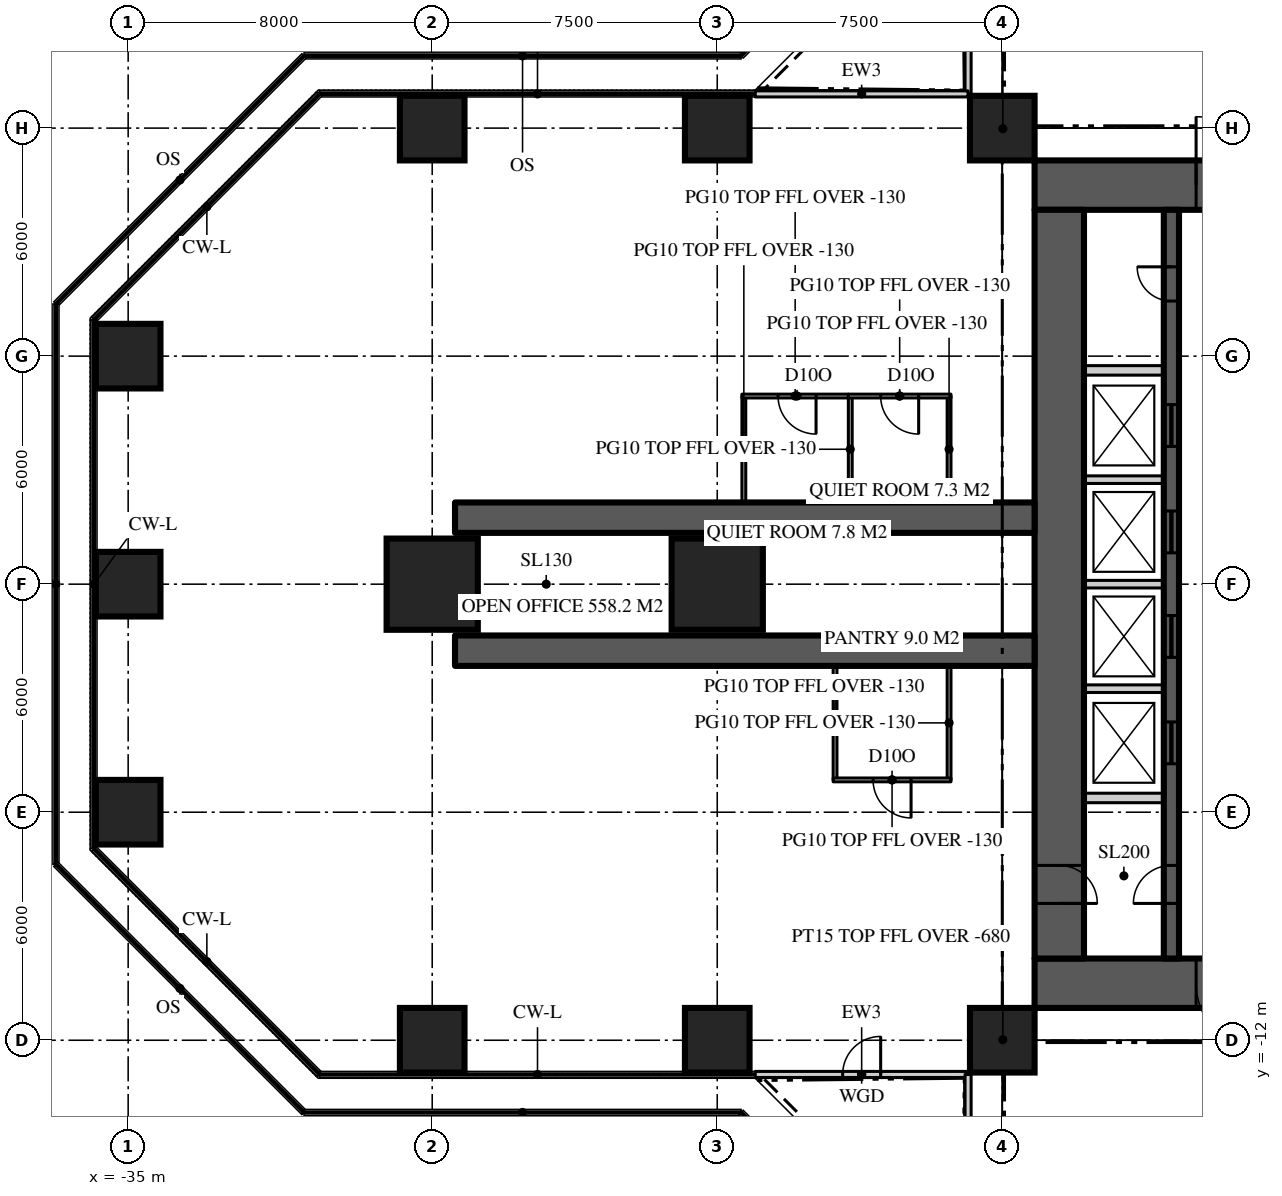
"""IFC4 building model, lengths in metres.
Left out: names, types, materials, properties, quantities, classifications, styles, units other than length and angle.
Written with IfcOpenShell. Run it as: python <this file> out.ifc"""

import sys

from ifc_helpers import new_model, si_unit, direction, frame, frame_2d, origin, origin_2d, place, context, subcontext, project, spatial, rectangle, extrude, element, fill, save


model = new_model("IFC4")
c1 = context("Model", 3, precision=1e-05, world=origin(), true_north=direction((0.0, 1.0)))
c2 = subcontext(c1, "Body", "Model", "MODEL_VIEW")
j1 = project(units=[si_unit("LENGTHUNIT", "METRE"), si_unit("PLANEANGLEUNIT", "RADIAN")], contexts=[c1])
p1 = place(None, origin())
s1 = spatial("IfcSite", under=j1, at=p1, CompositionType="ELEMENT")
p2 = place(p1, origin())
s2 = spatial("IfcBuilding", under=s1, at=p2, CompositionType="ELEMENT")
p3 = place(p2, frame((0.0, 0.0, 90.3)))
s3 = spatial("IfcBuildingStorey", under=s2, at=p3, CompositionType="ELEMENT", Elevation=90.3)
p4 = place(p3, frame((-11.15, 10.5, 0.0), z_axis=(0.0, 0.0, 1.0), x_axis=(1.0, 0.0, 0.0)))
e1 = element("IfcWall", 1, at=p4, inside=s3, PredefinedType="SHEAR", context=c2, shape_type="SweptSolid", body=[
    extrude(rectangle(XDim=22.3, YDim=1.3, at=frame_2d((11.15, 0.0))), origin(), (0.0, 0.0, 1.0), 3.9),
])
p5 = place(p4, frame((4.25, 0.0, 0.0)))
e2 = element("IfcOpeningElement", 2, at=p5, cuts=e1, PredefinedType="OPENING", context=c2, shape_type="SweptSolid", body=[
    extrude(rectangle(XDim=1.8, YDim=2.2, at=frame_2d((0.9, 1.1))), frame((0.0, 0.66, 0.0), z_axis=(0.0, -1.0, 0.0), x_axis=(1.0, 0.0, 0.0)), (0.0, 0.0, 1.0), 1.32),
])
p6 = place(p4, frame((16.25, 0.0, 0.0)))
e3 = element("IfcOpeningElement", 3, at=p6, cuts=e1, PredefinedType="OPENING", context=c2, shape_type="SweptSolid", body=[
    extrude(rectangle(XDim=1.8, YDim=2.2, at=frame_2d((0.9, 1.1))), frame((0.0, 0.66, 0.0), z_axis=(0.0, -1.0, 0.0), x_axis=(1.0, 0.0, 0.0)), (0.0, 0.0, 1.0), 1.32),
])
p7 = place(p3, frame((11.15, -10.5, 0.0), z_axis=(0.0, 0.0, 1.0), x_axis=(-1.0, 0.0, 0.0)))
e4 = element("IfcWall", 4, at=p7, inside=s3, PredefinedType="SHEAR", context=c2, shape_type="SweptSolid", body=[
    extrude(rectangle(XDim=22.3, YDim=1.3, at=frame_2d((11.15, 0.0))), origin(), (0.0, 0.0, 1.0), 3.9),
])
p8 = place(p7, frame((16.25, 0.0, 0.0)))
e5 = element("IfcOpeningElement", 5, at=p8, cuts=e4, PredefinedType="OPENING", context=c2, shape_type="SweptSolid", body=[
    extrude(rectangle(XDim=1.8, YDim=2.2, at=frame_2d((0.9, 1.1))), frame((0.0, 0.66, 0.0), z_axis=(0.0, -1.0, 0.0), x_axis=(1.0, 0.0, 0.0)), (0.0, 0.0, 1.0), 1.32),
])
p9 = place(p7, frame((4.25, 0.0, 0.0)))
e6 = element("IfcOpeningElement", 6, at=p9, cuts=e4, PredefinedType="OPENING", context=c2, shape_type="SweptSolid", body=[
    extrude(rectangle(XDim=1.8, YDim=2.2, at=frame_2d((0.9, 1.1))), frame((0.0, 0.66, 0.0), z_axis=(0.0, -1.0, 0.0), x_axis=(1.0, 0.0, 0.0)), (0.0, 0.0, 1.0), 1.32),
])
p10 = place(p3, frame((-10.5, 9.85, 0.0), z_axis=(0.0, 0.0, 1.0), x_axis=(0.0, -1.0, 0.0)))
e7 = element("IfcWall", 7, at=p10, inside=s3, PredefinedType="SHEAR", context=c2, shape_type="SweptSolid", body=[
    extrude(rectangle(XDim=19.7, YDim=1.3, at=frame_2d((9.85, 0.0))), origin(), (0.0, 0.0, 1.0), 3.9),
])
p11 = place(p10, frame((17.25, 0.0, 0.0)))
e8 = element("IfcOpeningElement", 8, at=p11, cuts=e7, PredefinedType="OPENING", context=c2, shape_type="SweptSolid", body=[
    extrude(rectangle(XDim=1.0, YDim=2.2, at=frame_2d((0.5, 1.1))), frame((0.0, 0.66, 0.0), z_axis=(0.0, -1.0, 0.0), x_axis=(1.0, 0.0, 0.0)), (0.0, 0.0, 1.0), 1.32),
])
for number, where, z_axis, x_axis in (
    (9, (-11.15, 1.75, 0.0), (0.0, 0.0, 1.0), (-1.0, 0.0, 0.0)),
    (10, (-11.15, -1.75, 0.0), (0.0, 0.0, 1.0), (-1.0, 0.0, 0.0)),
):
    element("IfcWall", number, at=place(p3, frame(where, z_axis=z_axis, x_axis=x_axis)), inside=s3, PredefinedType="SHEAR", context=c2, shape_type="SweptSolid", body=[
        extrude(rectangle(XDim=15.25, YDim=0.8, at=frame_2d((7.625, 0.0))), origin(), (0.0, 0.0, 1.0), 3.9),
    ])
for number, where, z_axis, x_axis in (
    (11, (-27.0, -12.0, 0.0), (0.0, 0.0, 1.0), (1.0, 0.0, 0.0)),
    (12, (-19.5, -12.0, 0.0), (0.0, 0.0, 1.0), (1.0, 0.0, 0.0)),
    (13, (-12.0, -12.0, 0.0), (0.0, 0.0, 1.0), (1.0, 0.0, 0.0)),
    (14, (-35.0, -6.0, 0.0), (0.0, 0.0, 1.0), (1.0, 0.0, 0.0)),
    (15, (-35.0, 0.0, 0.0), (0.0, 0.0, 1.0), (1.0, 0.0, 0.0)),
):
    element("IfcColumn", number, at=place(p3, frame(where, z_axis=z_axis, x_axis=x_axis)), inside=s3, PredefinedType="COLUMN", context=c2, shape_type="SweptSolid", body=[
        extrude(rectangle(XDim=1.7, YDim=1.7, at=origin_2d()), origin(), (0.0, 0.0, 1.0), 3.9),
    ])
for number, where, z_axis, x_axis in (
    (16, (-27.0, 0.0, 0.0), (0.0, 0.0, 1.0), (1.0, 0.0, 0.0)),
    (17, (-19.5, 0.0, 0.0), (0.0, 0.0, 1.0), (1.0, 0.0, 0.0)),
):
    element("IfcColumn", number, at=place(p3, frame(where, z_axis=z_axis, x_axis=x_axis)), inside=s3, PredefinedType="COLUMN", context=c2, shape_type="SweptSolid", body=[
        extrude(rectangle(XDim=2.4, YDim=2.4, at=origin_2d()), origin(), (0.0, 0.0, 1.0), 3.9),
    ])
for number, where, z_axis, x_axis in (
    (18, (-35.0, 6.0, 0.0), (0.0, 0.0, 1.0), (1.0, 0.0, 0.0)),
    (19, (-27.0, 12.0, 0.0), (0.0, 0.0, 1.0), (1.0, 0.0, 0.0)),
    (20, (-19.5, 12.0, 0.0), (0.0, 0.0, 1.0), (1.0, 0.0, 0.0)),
    (21, (-12.0, 12.0, 0.0), (0.0, 0.0, 1.0), (1.0, 0.0, 0.0)),
):
    element("IfcColumn", number, at=place(p3, frame(where, z_axis=z_axis, x_axis=x_axis)), inside=s3, PredefinedType="COLUMN", context=c2, shape_type="SweptSolid", body=[
        extrude(rectangle(XDim=1.7, YDim=1.7, at=origin_2d()), origin(), (0.0, 0.0, 1.0), 3.9),
    ])
p12 = place(p3, frame((-12.9, 18.5, 0.0), z_axis=(0.0, 0.0, 1.0), x_axis=(0.0, -1.0, 0.0)))
e22 = element("IfcWall", 22, at=p12, inside=s3, PredefinedType="SOLIDWALL", context=c2, shape_type="SweptSolid", body=[
    extrude(rectangle(XDim=5.6, YDim=0.16, at=frame_2d((2.8, 0.0))), origin(), (0.0, 0.0, 1.0), 3.77),
])
p13 = place(p12, frame((2.3, 0.0, 0.0)))
e23 = element("IfcOpeningElement", 23, at=p13, cuts=e22, PredefinedType="OPENING", context=c2, shape_type="SweptSolid", body=[
    extrude(rectangle(XDim=1.0, YDim=2.2, at=frame_2d((0.5, 1.1))), frame((0.0, 0.09, 0.0), z_axis=(0.0, -1.0, 0.0), x_axis=(1.0, 0.0, 0.0)), (0.0, 0.0, 1.0), 0.18),
])
p14 = place(p3, frame((-12.9, 12.9, 0.0), z_axis=(0.0, 0.0, 1.0), x_axis=(-1.0, 0.0, 0.0)))
e24 = element("IfcWall", 24, at=p14, inside=s3, PredefinedType="SOLIDWALL", context=c2, shape_type="SweptSolid", body=[
    extrude(rectangle(XDim=5.6, YDim=0.16, at=frame_2d((2.8, 0.0))), origin(), (0.0, 0.0, 1.0), 3.77),
])
p15 = place(p3, frame((-18.5, -12.9, 0.0), z_axis=(0.0, 0.0, 1.0), x_axis=(1.0, 0.0, 0.0)))
e25 = element("IfcWall", 25, at=p15, inside=s3, PredefinedType="SOLIDWALL", context=c2, shape_type="SweptSolid", body=[
    extrude(rectangle(XDim=5.6, YDim=0.16, at=frame_2d((2.8, 0.0))), origin(), (0.0, 0.0, 1.0), 3.77),
])
p16 = place(p15, frame((2.3, 0.0, 0.0)))
e26 = element("IfcOpeningElement", 26, at=p16, cuts=e25, PredefinedType="OPENING", context=c2, shape_type="SweptSolid", body=[
    extrude(rectangle(XDim=1.0, YDim=2.2, at=frame_2d((0.5, 1.1))), frame((0.0, 0.09, 0.0), z_axis=(0.0, -1.0, 0.0), x_axis=(1.0, 0.0, 0.0)), (0.0, 0.0, 1.0), 0.18),
])
p17 = place(p3, frame((-12.9, -12.9, 0.0), z_axis=(0.0, 0.0, 1.0), x_axis=(0.0, -1.0, 0.0)))
e27 = element("IfcWall", 27, at=p17, inside=s3, PredefinedType="SOLIDWALL", context=c2, shape_type="SweptSolid", body=[
    extrude(rectangle(XDim=5.6, YDim=0.16, at=frame_2d((2.8, 0.0))), origin(), (0.0, 0.0, 1.0), 3.77),
])
p18 = place(p3, frame((-7.55, -9.85, 0.0), z_axis=(0.0, 0.0, 1.0), x_axis=(0.0, 1.0, 0.0)))
e28 = element("IfcWall", 28, at=p18, inside=s3, PredefinedType="SHEAR", context=c2, shape_type="SweptSolid", body=[
    extrude(rectangle(XDim=19.7, YDim=0.4, at=frame_2d((9.85, 0.0))), origin(), (0.0, 0.0, 1.0), 3.9),
])
p19 = place(p18, frame((1.45, 0.0, 0.0)))
e29 = element("IfcOpeningElement", 29, at=p19, cuts=e28, PredefinedType="OPENING", context=c2, shape_type="SweptSolid", body=[
    extrude(rectangle(XDim=1.0, YDim=2.2, at=frame_2d((0.5, 1.1))), frame((0.0, 0.21, 0.0), z_axis=(0.0, -1.0, 0.0), x_axis=(1.0, 0.0, 0.0)), (0.0, 0.0, 1.0), 0.42),
])
p20 = place(p18, frame((17.3, 0.0, 0.0)))
e30 = element("IfcOpeningElement", 30, at=p20, cuts=e28, PredefinedType="OPENING", context=c2, shape_type="SweptSolid", body=[
    extrude(rectangle(XDim=0.9, YDim=2.1, at=frame_2d((0.45, 1.05))), frame((0.0, 0.21, 0.0), z_axis=(0.0, -1.0, 0.0), x_axis=(1.0, 0.0, 0.0)), (0.0, 0.0, 1.0), 0.42),
])
p21 = place(p18, frame((5.125, 0.0, 0.0)))
e31 = element("IfcOpeningElement", 31, at=p21, cuts=e28, PredefinedType="OPENING", context=c2, shape_type="SweptSolid", body=[
    extrude(rectangle(XDim=1.1, YDim=2.2, at=frame_2d((0.55, 1.1))), frame((0.0, 0.21, 0.0), z_axis=(0.0, -1.0, 0.0), x_axis=(1.0, 0.0, 0.0)), (0.0, 0.0, 1.0), 0.42),
])
p22 = place(p18, frame((7.925, 0.0, 0.0)))
e32 = element("IfcOpeningElement", 32, at=p22, cuts=e28, PredefinedType="OPENING", context=c2, shape_type="SweptSolid", body=[
    extrude(rectangle(XDim=1.1, YDim=2.2, at=frame_2d((0.55, 1.1))), frame((0.0, 0.21, 0.0), z_axis=(0.0, -1.0, 0.0), x_axis=(1.0, 0.0, 0.0)), (0.0, 0.0, 1.0), 0.42),
])
p23 = place(p18, frame((10.675, 0.0, 0.0)))
e33 = element("IfcOpeningElement", 33, at=p23, cuts=e28, PredefinedType="OPENING", context=c2, shape_type="SweptSolid", body=[
    extrude(rectangle(XDim=1.1, YDim=2.2, at=frame_2d((0.55, 1.1))), frame((0.0, 0.21, 0.0), z_axis=(0.0, -1.0, 0.0), x_axis=(1.0, 0.0, 0.0)), (0.0, 0.0, 1.0), 0.42),
])
p24 = place(p18, frame((13.475, 0.0, 0.0)))
e34 = element("IfcOpeningElement", 34, at=p24, cuts=e28, PredefinedType="OPENING", context=c2, shape_type="SweptSolid", body=[
    extrude(rectangle(XDim=1.1, YDim=2.2, at=frame_2d((0.55, 1.1))), frame((0.0, 0.21, 0.0), z_axis=(0.0, -1.0, 0.0), x_axis=(1.0, 0.0, 0.0)), (0.0, 0.0, 1.0), 0.42),
])
for number, where, z_axis, x_axis in (
    (35, (-9.85, 5.625, 0.0), (0.0, 0.0, 1.0), (1.0, 0.0, 0.0)),
    (36, (-9.85, -5.625, 0.0), (0.0, 0.0, 1.0), (1.0, 0.0, 0.0)),
):
    element("IfcWall", number, at=place(p3, frame(where, z_axis=z_axis, x_axis=x_axis)), inside=s3, PredefinedType="SOLIDWALL", context=c2, shape_type="SweptSolid", body=[
        extrude(rectangle(XDim=2.1, YDim=0.25, at=frame_2d((1.05, 0.0))), origin(), (0.0, 0.0, 1.0), 3.7),
    ])
for number, where, z_axis, x_axis in (
    (37, (-9.85, -2.75, 0.0), (0.0, 0.0, 1.0), (1.0, 0.0, 0.0)),
    (38, (-9.85, 0.0, 0.0), (0.0, 0.0, 1.0), (1.0, 0.0, 0.0)),
    (39, (-9.85, 2.75, 0.0), (0.0, 0.0, 1.0), (1.0, 0.0, 0.0)),
):
    element("IfcWall", number, at=place(p3, frame(where, z_axis=z_axis, x_axis=x_axis)), inside=s3, PredefinedType="SOLIDWALL", context=c2, shape_type="SweptSolid", body=[
        extrude(rectangle(XDim=2.1, YDim=0.2, at=frame_2d((1.05, 0.0))), origin(), (0.0, 0.0, 1.0), 3.7),
    ])
for number, where, z_axis, x_axis in (
    (40, (-13.4, -2.15, 0.0), (0.0, 0.0, 1.0), (0.0, -1.0, 0.0)),
    (41, (-16.4, -2.15, 0.0), (0.0, 0.0, 1.0), (0.0, -1.0, 0.0)),
):
    element("IfcWall", number, at=place(p3, frame(where, z_axis=z_axis, x_axis=x_axis)), inside=s3, PredefinedType="PARTITIONING", context=c2, shape_type="SweptSolid", body=[
        extrude(rectangle(XDim=3.0, YDim=0.1, at=frame_2d((1.5, 0.0))), origin(), (0.0, 0.0, 1.0), 3.77),
    ])
p25 = place(p3, frame((-13.35, -5.15, 0.0), z_axis=(0.0, 0.0, 1.0), x_axis=(-1.0, 0.0, 0.0)))
e42 = element("IfcWall", 42, at=p25, inside=s3, PredefinedType="PARTITIONING", context=c2, shape_type="SweptSolid", body=[
    extrude(rectangle(XDim=3.1, YDim=0.1, at=frame_2d((1.55, 0.0))), origin(), (0.0, 0.0, 1.0), 3.77),
])
p26 = place(p25, frame((1.05, 0.0, 0.0)))
e43 = element("IfcOpeningElement", 43, at=p26, cuts=e42, PredefinedType="OPENING", context=c2, shape_type="SweptSolid", body=[
    extrude(rectangle(XDim=1.0, YDim=2.2, at=frame_2d((0.5, 1.1))), frame((0.0, 0.06, 0.0), z_axis=(0.0, -1.0, 0.0), x_axis=(1.0, 0.0, 0.0)), (0.0, 0.0, 1.0), 0.12),
])
for number, where, z_axis, x_axis in (
    (44, (-13.4, 2.15, 0.0), (0.0, 0.0, 1.0), (0.0, 1.0, 0.0)),
    (45, (-16.0, 2.15, 0.0), (0.0, 0.0, 1.0), (0.0, 1.0, 0.0)),
):
    element("IfcWall", number, at=place(p3, frame(where, z_axis=z_axis, x_axis=x_axis)), inside=s3, PredefinedType="PARTITIONING", context=c2, shape_type="SweptSolid", body=[
        extrude(rectangle(XDim=2.8, YDim=0.1, at=frame_2d((1.4, 0.0))), origin(), (0.0, 0.0, 1.0), 3.77),
    ])
p27 = place(p3, frame((-13.35, 4.95, 0.0), z_axis=(0.0, 0.0, 1.0), x_axis=(-1.0, 0.0, 0.0)))
e46 = element("IfcWall", 46, at=p27, inside=s3, PredefinedType="PARTITIONING", context=c2, shape_type="SweptSolid", body=[
    extrude(rectangle(XDim=2.7, YDim=0.1, at=frame_2d((1.35, 0.0))), origin(), (0.0, 0.0, 1.0), 3.77),
])
p28 = place(p27, frame((0.85, 0.0, 0.0)))
e47 = element("IfcOpeningElement", 47, at=p28, cuts=e46, PredefinedType="OPENING", context=c2, shape_type="SweptSolid", body=[
    extrude(rectangle(XDim=1.0, YDim=2.2, at=frame_2d((0.5, 1.1))), frame((0.0, 0.06, 0.0), z_axis=(0.0, -1.0, 0.0), x_axis=(1.0, 0.0, 0.0)), (0.0, 0.0, 1.0), 0.12),
])
p29 = place(p3, frame((-18.8, 2.15, 0.0), z_axis=(0.0, 0.0, 1.0), x_axis=(0.0, 1.0, 0.0)))
e48 = element("IfcWall", 48, at=p29, inside=s3, PredefinedType="PARTITIONING", context=c2, shape_type="SweptSolid", body=[
    extrude(rectangle(XDim=2.8, YDim=0.1, at=frame_2d((1.4, 0.0))), origin(), (0.0, 0.0, 1.0), 3.77),
])
p30 = place(p3, frame((-16.05, 4.95, 0.0), z_axis=(0.0, 0.0, 1.0), x_axis=(-1.0, 0.0, 0.0)))
e49 = element("IfcWall", 49, at=p30, inside=s3, PredefinedType="PARTITIONING", context=c2, shape_type="SweptSolid", body=[
    extrude(rectangle(XDim=2.8, YDim=0.1, at=frame_2d((1.4, 0.0))), origin(), (0.0, 0.0, 1.0), 3.77),
])
p31 = place(p30, frame((0.85, 0.0, 0.0)))
e50 = element("IfcOpeningElement", 50, at=p31, cuts=e49, PredefinedType="OPENING", context=c2, shape_type="SweptSolid", body=[
    extrude(rectangle(XDim=1.0, YDim=2.2, at=frame_2d((0.5, 1.1))), frame((0.0, 0.06, 0.0), z_axis=(0.0, -1.0, 0.0), x_axis=(1.0, 0.0, 0.0)), (0.0, 0.0, 1.0), 0.12),
])
for number, where, z_axis, x_axis in (
    (51, (-11.15, 11.15, 0.0), (0.0, 0.0, 1.0), (-0.707, 0.707, 0.0)),
    (52, (-11.15, -11.15, 0.0), (0.0, 0.0, 1.0), (-0.707, -0.707, 0.0)),
):
    element("IfcWall", number, at=place(p3, frame(where, z_axis=z_axis, x_axis=x_axis)), inside=s3, PredefinedType="PARTITIONING", context=c2, shape_type="SweptSolid", body=[
        extrude(rectangle(XDim=2.362, YDim=0.15, at=frame_2d((1.181, 0.0))), origin(), (0.0, 0.0, 1.0), 3.22),
    ])
p32 = place(p16, origin())
e53 = element("IfcDoor", 53, at=p32, inside=s3, OperationType="SINGLE_SWING_RIGHT", PredefinedType="DOOR", context=c2, shape_type="SweptSolid", body=[
    extrude(rectangle(XDim=1.0, YDim=2.2, at=frame_2d((0.5, 1.1))), frame((0.0, 0.025, 0.0), z_axis=(0.0, -1.0, 0.0), x_axis=(1.0, 0.0, 0.0)), (0.0, 0.0, 1.0), 0.05),
])
fill(e26, e53)
p33 = place(p5, origin())
e54 = element("IfcDoor", 54, at=p33, inside=s3, OperationType="DOUBLE_DOOR_DOUBLE_SWING", PredefinedType="DOOR", context=c2, shape_type="SweptSolid", body=[
    extrude(rectangle(XDim=1.8, YDim=2.2, at=frame_2d((0.9, 1.1))), frame((0.0, 0.025, 0.0), z_axis=(0.0, -1.0, 0.0), x_axis=(1.0, 0.0, 0.0)), (0.0, 0.0, 1.0), 0.05),
])
fill(e2, e54)
p34 = place(p8, origin())
e55 = element("IfcDoor", 55, at=p34, inside=s3, OperationType="DOUBLE_DOOR_DOUBLE_SWING", PredefinedType="DOOR", context=c2, shape_type="SweptSolid", body=[
    extrude(rectangle(XDim=1.8, YDim=2.2, at=frame_2d((0.9, 1.1))), frame((0.0, 0.025, 0.0), z_axis=(0.0, -1.0, 0.0), x_axis=(1.0, 0.0, 0.0)), (0.0, 0.0, 1.0), 0.05),
])
fill(e5, e55)
p35 = place(p19, origin())
e56 = element("IfcDoor", 56, at=p35, inside=s3, OperationType="SINGLE_SWING_LEFT", PredefinedType="DOOR", context=c2, shape_type="SweptSolid", body=[
    extrude(rectangle(XDim=1.0, YDim=2.2, at=frame_2d((0.5, 1.1))), frame((0.0, 0.025, 0.0), z_axis=(0.0, -1.0, 0.0), x_axis=(1.0, 0.0, 0.0)), (0.0, 0.0, 1.0), 0.05),
])
fill(e29, e56)
p36 = place(p11, origin())
e57 = element("IfcDoor", 57, at=p36, inside=s3, OperationType="SINGLE_SWING_RIGHT", PredefinedType="DOOR", context=c2, shape_type="SweptSolid", body=[
    extrude(rectangle(XDim=1.0, YDim=2.2, at=frame_2d((0.5, 1.1))), frame((0.0, 0.025, 0.0), z_axis=(0.0, -1.0, 0.0), x_axis=(1.0, 0.0, 0.0)), (0.0, 0.0, 1.0), 0.05),
])
fill(e8, e57)
p37 = place(p20, origin())
e58 = element("IfcDoor", 58, at=p37, inside=s3, OperationType="SINGLE_SWING_RIGHT", PredefinedType="DOOR", context=c2, shape_type="SweptSolid", body=[
    extrude(rectangle(XDim=0.9, YDim=2.1, at=frame_2d((0.45, 1.05))), frame((0.0, 0.025, 0.0), z_axis=(0.0, -1.0, 0.0), x_axis=(1.0, 0.0, 0.0)), (0.0, 0.0, 1.0), 0.05),
])
fill(e30, e58)
p38 = place(p21, origin())
e59 = element("IfcDoor", 59, at=p38, inside=s3, OperationType="SLIDING_TO_LEFT", PredefinedType="DOOR", context=c2, shape_type="SweptSolid", body=[
    extrude(rectangle(XDim=1.1, YDim=2.2, at=frame_2d((0.55, 1.1))), frame((0.0, 0.025, 0.0), z_axis=(0.0, -1.0, 0.0), x_axis=(1.0, 0.0, 0.0)), (0.0, 0.0, 1.0), 0.05),
])
fill(e31, e59)
p39 = place(p22, origin())
e60 = element("IfcDoor", 60, at=p39, inside=s3, OperationType="SLIDING_TO_LEFT", PredefinedType="DOOR", context=c2, shape_type="SweptSolid", body=[
    extrude(rectangle(XDim=1.1, YDim=2.2, at=frame_2d((0.55, 1.1))), frame((0.0, 0.025, 0.0), z_axis=(0.0, -1.0, 0.0), x_axis=(1.0, 0.0, 0.0)), (0.0, 0.0, 1.0), 0.05),
])
fill(e32, e60)
p40 = place(p23, origin())
e61 = element("IfcDoor", 61, at=p40, inside=s3, OperationType="SLIDING_TO_LEFT", PredefinedType="DOOR", context=c2, shape_type="SweptSolid", body=[
    extrude(rectangle(XDim=1.1, YDim=2.2, at=frame_2d((0.55, 1.1))), frame((0.0, 0.025, 0.0), z_axis=(0.0, -1.0, 0.0), x_axis=(1.0, 0.0, 0.0)), (0.0, 0.0, 1.0), 0.05),
])
fill(e33, e61)
p41 = place(p24, origin())
e62 = element("IfcDoor", 62, at=p41, inside=s3, OperationType="SLIDING_TO_LEFT", PredefinedType="DOOR", context=c2, shape_type="SweptSolid", body=[
    extrude(rectangle(XDim=1.1, YDim=2.2, at=frame_2d((0.55, 1.1))), frame((0.0, 0.025, 0.0), z_axis=(0.0, -1.0, 0.0), x_axis=(1.0, 0.0, 0.0)), (0.0, 0.0, 1.0), 0.05),
])
fill(e34, e62)
p42 = place(p26, origin())
e63 = element("IfcDoor", 63, at=p42, inside=s3, OperationType="SINGLE_SWING_LEFT", PredefinedType="DOOR", context=c2, shape_type="SweptSolid", body=[
    extrude(rectangle(XDim=1.0, YDim=2.2, at=frame_2d((0.5, 1.1))), frame((0.0, 0.025, 0.0), z_axis=(0.0, -1.0, 0.0), x_axis=(1.0, 0.0, 0.0)), (0.0, 0.0, 1.0), 0.05),
])
fill(e43, e63)
p43 = place(p28, origin())
e64 = element("IfcDoor", 64, at=p43, inside=s3, OperationType="SINGLE_SWING_LEFT", PredefinedType="DOOR", context=c2, shape_type="SweptSolid", body=[
    extrude(rectangle(XDim=1.0, YDim=2.2, at=frame_2d((0.5, 1.1))), frame((0.0, 0.025, 0.0), z_axis=(0.0, -1.0, 0.0), x_axis=(1.0, 0.0, 0.0)), (0.0, 0.0, 1.0), 0.05),
])
fill(e47, e64)
p44 = place(p31, origin())
e65 = element("IfcDoor", 65, at=p44, inside=s3, OperationType="SINGLE_SWING_LEFT", PredefinedType="DOOR", context=c2, shape_type="SweptSolid", body=[
    extrude(rectangle(XDim=1.0, YDim=2.2, at=frame_2d((0.5, 1.1))), frame((0.0, 0.025, 0.0), z_axis=(0.0, -1.0, 0.0), x_axis=(1.0, 0.0, 0.0)), (0.0, 0.0, 1.0), 0.05),
])
fill(e50, e65)
save(model, sys.argv[1])
